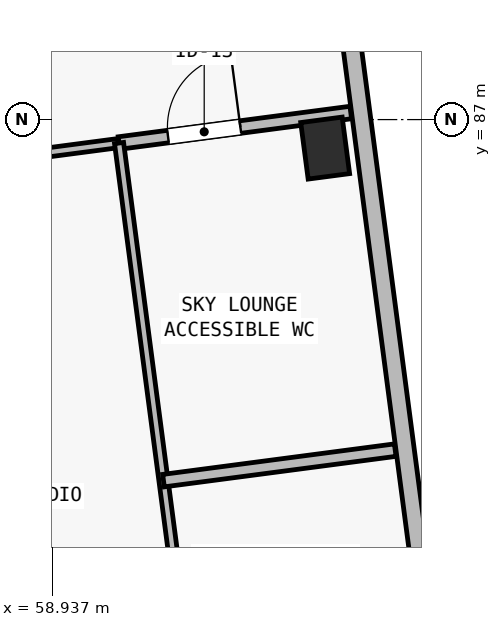
"""IFC4 building model, lengths in metres.
Left out: names, types, materials, properties, quantities, classifications, styles, units other than length and angle.
Written with IfcOpenShell. Run it as: python <this file> out.ifc"""

import sys

from ifc_helpers import new_model, si_unit, direction, frame, frame_2d, origin, origin_2d, place, context, subcontext, project, spatial, rectangle, extrude, element, fill, save


model = new_model("IFC4")
c1 = context("Model", 3, precision=1e-05, world=origin(), true_north=direction((0.0, 1.0)))
c2 = subcontext(c1, "Body", "Model", "MODEL_VIEW")
j1 = project(units=[si_unit("LENGTHUNIT", "METRE"), si_unit("PLANEANGLEUNIT", "RADIAN")], contexts=[c1])
p1 = place(None, origin())
s1 = spatial("IfcSite", under=j1, at=p1, CompositionType="ELEMENT")
p2 = place(p1, origin())
s2 = spatial("IfcBuilding", under=s1, at=p2, CompositionType="ELEMENT")
p3 = place(p2, frame((0.0, 0.0, 8.4)))
s3 = spatial("IfcBuildingStorey", under=s2, at=p3, CompositionType="ELEMENT", Elevation=8.4)
p4 = place(p3, frame((62.53, 86.625, 0.0), z_axis=(0.0, 0.0, 1.0), x_axis=(0.991444861374, 0.13052619222, 0.0)))
e1 = element("IfcColumn", 1, at=p4, inside=s3, PredefinedType="COLUMN", context=c2, shape_type="SweptSolid", body=[
    extrude(rectangle(XDim=0.55, YDim=0.75, at=origin_2d()), origin(), (0.0, 0.0, 1.0), 3.25),
])
p5 = place(p3, frame((61.39, 99.31, 0.0), z_axis=(0.0, 0.0, 1.0), x_axis=(0.13052411616, -0.99144513469, 0.0)))
e2 = element("IfcWall", 2, at=p5, inside=s3, PredefinedType="SOLIDWALL", context=c2, shape_type="SweptSolid", body=[
    extrude(rectangle(XDim=21.05, YDim=0.24, at=frame_2d((10.525, 0.0))), origin(), (0.0, 0.0, 1.0), 3.0),
])
p6 = place(p5, frame((2.81, 0.0, 0.45)))
e3 = element("IfcOpeningElement", 3, at=p6, cuts=e2, PredefinedType="OPENING", context=c2, shape_type="SweptSolid", body=[
    extrude(rectangle(XDim=0.86, YDim=2.36, at=frame_2d((0.43, 1.18))), frame((0.0, 0.135, 0.0), z_axis=(0.0, -1.0, 0.0), x_axis=(1.0, 0.0, 0.0)), (0.0, 0.0, 1.0), 0.27),
])
p7 = place(p3, frame((54.033, 85.93, 0.0), z_axis=(0.0, 0.0, 1.0), x_axis=(0.991442898952, 0.130541097431, 0.0)))
e4 = element("IfcWall", 4, at=p7, inside=s3, PredefinedType="PARTITIONING", context=c2, shape_type="SweptSolid", body=[
    extrude(rectangle(XDim=5.835, YDim=0.12, at=frame_2d((2.917, 0.0))), origin(), (0.0, 0.0, 1.0), 2.97),
])
p8 = place(p7, frame((1.15, 0.0, 0.0)))
e5 = element("IfcOpeningElement", 5, at=p8, cuts=e4, PredefinedType="OPENING", context=c2, shape_type="SweptSolid", body=[
    extrude(rectangle(XDim=1.15, YDim=2.15, at=frame_2d((0.575, 1.075))), frame((0.0, 0.075, 0.0), z_axis=(0.0, -1.0, 0.0), x_axis=(1.0, 0.0, 0.0)), (0.0, 0.0, 1.0), 0.15),
])
p9 = place(p3, frame((59.818, 86.692, 0.0), z_axis=(0.0, 0.0, 1.0), x_axis=(0.991444293548, 0.130530505213, 0.0)))
e6 = element("IfcWall", 6, at=p9, inside=s3, PredefinedType="PLUMBINGWALL", context=c2, shape_type="SweptSolid", body=[
    extrude(rectangle(XDim=3.075, YDim=0.165, at=frame_2d((1.538, 0.0))), origin(), (0.0, 0.0, 1.0), 2.97),
])
p10 = place(p9, frame((0.65, 0.0, 0.0)))
e7 = element("IfcOpeningElement", 7, at=p10, cuts=e6, PredefinedType="OPENING", context=c2, shape_type="SweptSolid", body=[
    extrude(rectangle(XDim=0.96, YDim=2.12, at=frame_2d((0.48, 1.06))), frame((0.0, 0.097, 0.0), z_axis=(0.0, -1.0, 0.0), x_axis=(1.0, 0.0, 0.0)), (0.0, 0.0, 1.0), 0.195),
])
p11 = place(p3, frame((60.942, 78.155, 0.0), z_axis=(0.0, 0.0, 1.0), x_axis=(-0.13051979335, 0.99144570378, 0.0)))
e8 = element("IfcWall", 8, at=p11, inside=s3, PredefinedType="PARTITIONING", context=c2, shape_type="SweptSolid", body=[
    extrude(rectangle(XDim=8.61, YDim=0.12, at=frame_2d((4.305, 0.0))), origin(), (0.0, 0.0, 1.0), 2.97),
])
p12 = place(p11, frame((1.25, 0.0, 0.0)))
e9 = element("IfcOpeningElement", 9, at=p12, cuts=e8, PredefinedType="OPENING", context=c2, shape_type="SweptSolid", body=[
    extrude(rectangle(XDim=0.88, YDim=2.1, at=frame_2d((0.44, 1.05))), frame((0.0, 0.075, 0.0), z_axis=(0.0, -1.0, 0.0), x_axis=(1.0, 0.0, 0.0)), (0.0, 0.0, 1.0), 0.15),
])
p13 = place(p3, frame((60.403, 82.25, 0.0), z_axis=(0.0, 0.0, 1.0), x_axis=(0.991444293548, 0.130530505213, 0.0)))
e10 = element("IfcWall", 10, at=p13, inside=s3, PredefinedType="PLUMBINGWALL", context=c2, shape_type="SweptSolid", body=[
    extrude(rectangle(XDim=3.075, YDim=0.165, at=frame_2d((1.538, 0.0))), origin(), (0.0, 0.0, 1.0), 2.97),
])
p14 = place(p10, origin())
e11 = element("IfcDoor", 11, at=p14, inside=s3, OperationType="SINGLE_SWING_RIGHT", PredefinedType="DOOR", context=c2, shape_type="SweptSolid", body=[
    extrude(rectangle(XDim=0.96, YDim=2.12, at=frame_2d((0.48, 1.06))), frame((0.0, 0.025, 0.0), z_axis=(0.0, -1.0, 0.0), x_axis=(1.0, 0.0, 0.0)), (0.0, 0.0, 1.0), 0.05),
])
fill(e7, e11)
save(model, sys.argv[1])
